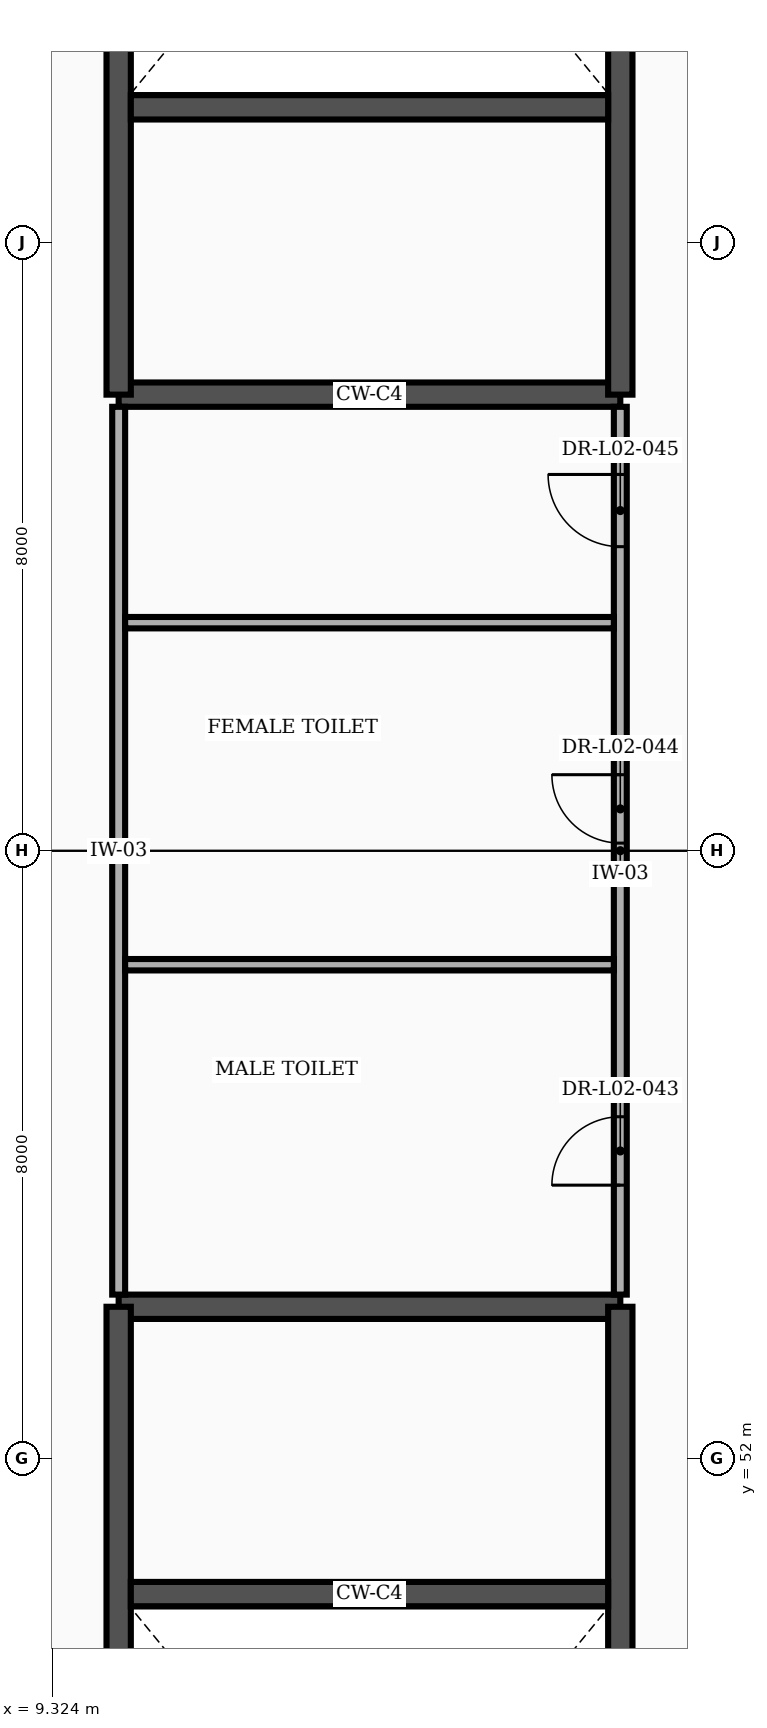
"""IFC4 building model, lengths in metres.
Left out: names, types, materials, properties, quantities, classifications, styles, units other than length and angle.
Written with IfcOpenShell. Run it as: python <this file> out.ifc"""

import sys

from ifc_helpers import new_model, si_unit, direction, frame, frame_2d, origin, place, context, subcontext, project, spatial, rectangle, extrude, element, fill, save


model = new_model("IFC4")
c1 = context("Model", 3, precision=1e-05, world=origin(), true_north=direction((0.0, 1.0)))
c2 = subcontext(c1, "Body", "Model", "MODEL_VIEW")
j1 = project(units=[si_unit("LENGTHUNIT", "METRE"), si_unit("PLANEANGLEUNIT", "RADIAN")], contexts=[c1])
p1 = place(None, origin())
s1 = spatial("IfcSite", under=j1, at=p1, CompositionType="ELEMENT")
p2 = place(p1, origin())
s2 = spatial("IfcBuilding", under=s1, at=p2, CompositionType="ELEMENT")
p3 = place(p2, frame((0.0, 0.0, 11.4)))
s3 = spatial("IfcBuildingStorey", under=s2, at=p3, CompositionType="ELEMENT", Elevation=11.4)
p4 = place(p3, frame((10.2, 54.0, 0.0), z_axis=(0.0, 0.0, 1.0), x_axis=(1.0, 0.0, 0.0)))
e1 = element("IfcWall", 1, at=p4, inside=s3, PredefinedType="SHEAR", context=c2, shape_type="SweptSolid", body=[
    extrude(rectangle(XDim=6.6, YDim=0.32, at=frame_2d((3.3, 0.0))), origin(), (0.0, 0.0, 1.0), 5.15),
])
p5 = place(p3, frame((10.2, 39.4, 0.0), z_axis=(0.0, 0.0, 1.0), x_axis=(0.0, 1.0, 0.0)))
e2 = element("IfcWall", 2, at=p5, inside=s3, PredefinedType="SHEAR", context=c2, shape_type="SweptSolid", body=[
    extrude(rectangle(XDim=14.6, YDim=0.32, at=frame_2d((7.3, 0.0))), origin(), (0.0, 0.0, 1.0), 5.15),
])
p6 = place(p3, frame((16.8, 39.4, 0.0), z_axis=(0.0, 0.0, 1.0), x_axis=(0.0, 1.0, 0.0)))
e3 = element("IfcWall", 3, at=p6, inside=s3, PredefinedType="SHEAR", context=c2, shape_type="SweptSolid", body=[
    extrude(rectangle(XDim=14.6, YDim=0.32, at=frame_2d((7.3, 0.0))), origin(), (0.0, 0.0, 1.0), 5.15),
])
p7 = place(p6, frame((0.55, 0.0, 0.0)))
e4 = element("IfcOpeningElement", 4, at=p7, cuts=e3, PredefinedType="OPENING", context=c2, shape_type="SweptSolid", body=[
    extrude(rectangle(XDim=2.4, YDim=2.25, at=frame_2d((1.2, 1.125))), frame((0.0, 0.172, 0.0), z_axis=(0.0, -1.0, 0.0), x_axis=(1.0, 0.0, 0.0)), (0.0, 0.0, 1.0), 0.344),
])
p8 = place(p3, frame((10.36, 50.22, 0.0), z_axis=(0.0, 0.0, 1.0), x_axis=(1.0, 0.0, 0.0)))
e5 = element("IfcWall", 5, at=p8, inside=s3, PredefinedType="SHEAR", context=c2, shape_type="SweptSolid", body=[
    extrude(rectangle(XDim=6.28, YDim=0.32, at=frame_2d((3.14, 0.0))), origin(), (0.0, 0.0, 1.0), 5.15),
])
p9 = place(p3, frame((10.2, 66.0, 0.0), z_axis=(0.0, 0.0, 1.0), x_axis=(1.0, 0.0, 0.0)))
e6 = element("IfcWall", 6, at=p9, inside=s3, PredefinedType="SHEAR", context=c2, shape_type="SweptSolid", body=[
    extrude(rectangle(XDim=6.6, YDim=0.32, at=frame_2d((3.3, 0.0))), origin(), (0.0, 0.0, 1.0), 5.15),
])
p10 = place(p3, frame((10.2, 66.0, 0.0), z_axis=(0.0, 0.0, 1.0), x_axis=(0.0, 1.0, 0.0)))
e7 = element("IfcWall", 7, at=p10, inside=s3, PredefinedType="SHEAR", context=c2, shape_type="SweptSolid", body=[
    extrude(rectangle(XDim=14.6, YDim=0.32, at=frame_2d((7.3, 0.0))), origin(), (0.0, 0.0, 1.0), 5.15),
])
p11 = place(p3, frame((16.8, 66.0, 0.0), z_axis=(0.0, 0.0, 1.0), x_axis=(0.0, 1.0, 0.0)))
e8 = element("IfcWall", 8, at=p11, inside=s3, PredefinedType="SHEAR", context=c2, shape_type="SweptSolid", body=[
    extrude(rectangle(XDim=14.6, YDim=0.32, at=frame_2d((7.3, 0.0))), origin(), (0.0, 0.0, 1.0), 5.15),
])
p12 = place(p11, frame((11.65, 0.0, 0.0)))
e9 = element("IfcOpeningElement", 9, at=p12, cuts=e8, PredefinedType="OPENING", context=c2, shape_type="SweptSolid", body=[
    extrude(rectangle(XDim=2.4, YDim=2.25, at=frame_2d((1.2, 1.125))), frame((0.0, 0.172, 0.0), z_axis=(0.0, -1.0, 0.0), x_axis=(1.0, 0.0, 0.0)), (0.0, 0.0, 1.0), 0.344),
])
p13 = place(p3, frame((10.36, 69.78, 0.0), z_axis=(0.0, 0.0, 1.0), x_axis=(1.0, 0.0, 0.0)))
e10 = element("IfcWall", 10, at=p13, inside=s3, PredefinedType="SHEAR", context=c2, shape_type="SweptSolid", body=[
    extrude(rectangle(XDim=6.28, YDim=0.32, at=frame_2d((3.14, 0.0))), origin(), (0.0, 0.0, 1.0), 5.15),
])
p14 = place(p3, frame((10.2, 54.16, 0.0), z_axis=(0.0, 0.0, 1.0), x_axis=(0.0, 1.0, 0.0)))
e11 = element("IfcWall", 11, at=p14, inside=s3, PredefinedType="PARTITIONING", context=c2, shape_type="SweptSolid", body=[
    extrude(rectangle(XDim=11.68, YDim=0.17, at=frame_2d((5.84, 0.0))), origin(), (0.0, 0.0, 1.0), 5.15),
])
p15 = place(p3, frame((16.8, 54.16, 0.0), z_axis=(0.0, 0.0, 1.0), x_axis=(0.0, 1.0, 0.0)))
e12 = element("IfcWall", 12, at=p15, inside=s3, PredefinedType="PARTITIONING", context=c2, shape_type="SweptSolid", body=[
    extrude(rectangle(XDim=11.68, YDim=0.17, at=frame_2d((5.84, 0.0))), origin(), (0.0, 0.0, 1.0), 5.15),
])
p16 = place(p15, frame((1.44, 0.0, 0.0)))
e13 = element("IfcOpeningElement", 13, at=p16, cuts=e12, PredefinedType="OPENING", context=c2, shape_type="SweptSolid", body=[
    extrude(rectangle(XDim=0.9, YDim=2.1, at=frame_2d((0.45, 1.05))), frame((0.0, 0.097, 0.0), z_axis=(0.0, -1.0, 0.0), x_axis=(1.0, 0.0, 0.0)), (0.0, 0.0, 1.0), 0.194),
])
p17 = place(p15, frame((5.94, 0.0, 0.0)))
e14 = element("IfcOpeningElement", 14, at=p17, cuts=e12, PredefinedType="OPENING", context=c2, shape_type="SweptSolid", body=[
    extrude(rectangle(XDim=0.9, YDim=2.1, at=frame_2d((0.45, 1.05))), frame((0.0, 0.097, 0.0), z_axis=(0.0, -1.0, 0.0), x_axis=(1.0, 0.0, 0.0)), (0.0, 0.0, 1.0), 0.194),
])
p18 = place(p15, frame((9.84, 0.0, 0.0)))
e15 = element("IfcOpeningElement", 15, at=p18, cuts=e12, PredefinedType="OPENING", context=c2, shape_type="SweptSolid", body=[
    extrude(rectangle(XDim=0.95, YDim=2.1, at=frame_2d((0.475, 1.05))), frame((0.0, 0.097, 0.0), z_axis=(0.0, -1.0, 0.0), x_axis=(1.0, 0.0, 0.0)), (0.0, 0.0, 1.0), 0.194),
])
for number, where, z_axis, x_axis in (
    (16, (10.285, 58.5, 0.0), (0.0, 0.0, 1.0), (1.0, 0.0, 0.0)),
    (17, (10.285, 63.0, 0.0), (0.0, 0.0, 1.0), (1.0, 0.0, 0.0)),
):
    element("IfcWall", number, at=place(p3, frame(where, z_axis=z_axis, x_axis=x_axis)), inside=s3, PredefinedType="PARTITIONING", context=c2, shape_type="SweptSolid", body=[
        extrude(rectangle(XDim=6.43, YDim=0.15, at=frame_2d((3.215, 0.0))), origin(), (0.0, 0.0, 1.0), 5.15),
    ])
p19 = place(p16, origin())
e18 = element("IfcDoor", 18, at=p19, inside=s3, OperationType="SINGLE_SWING_LEFT", PredefinedType="DOOR", context=c2, shape_type="SweptSolid", body=[
    extrude(rectangle(XDim=0.9, YDim=2.1, at=frame_2d((0.45, 1.05))), frame((0.0, 0.025, 0.0), z_axis=(0.0, -1.0, 0.0), x_axis=(1.0, 0.0, 0.0)), (0.0, 0.0, 1.0), 0.05),
])
fill(e13, e18)
p20 = place(p17, origin())
e19 = element("IfcDoor", 19, at=p20, inside=s3, OperationType="SINGLE_SWING_RIGHT", PredefinedType="DOOR", context=c2, shape_type="SweptSolid", body=[
    extrude(rectangle(XDim=0.9, YDim=2.1, at=frame_2d((0.45, 1.05))), frame((0.0, 0.025, 0.0), z_axis=(0.0, -1.0, 0.0), x_axis=(1.0, 0.0, 0.0)), (0.0, 0.0, 1.0), 0.05),
])
fill(e14, e19)
p21 = place(p18, origin())
e20 = element("IfcDoor", 20, at=p21, inside=s3, OperationType="SINGLE_SWING_RIGHT", PredefinedType="DOOR", context=c2, shape_type="SweptSolid", body=[
    extrude(rectangle(XDim=0.95, YDim=2.1, at=frame_2d((0.475, 1.05))), frame((0.0, 0.025, 0.0), z_axis=(0.0, -1.0, 0.0), x_axis=(1.0, 0.0, 0.0)), (0.0, 0.0, 1.0), 0.05),
])
fill(e15, e20)
save(model, sys.argv[1])
